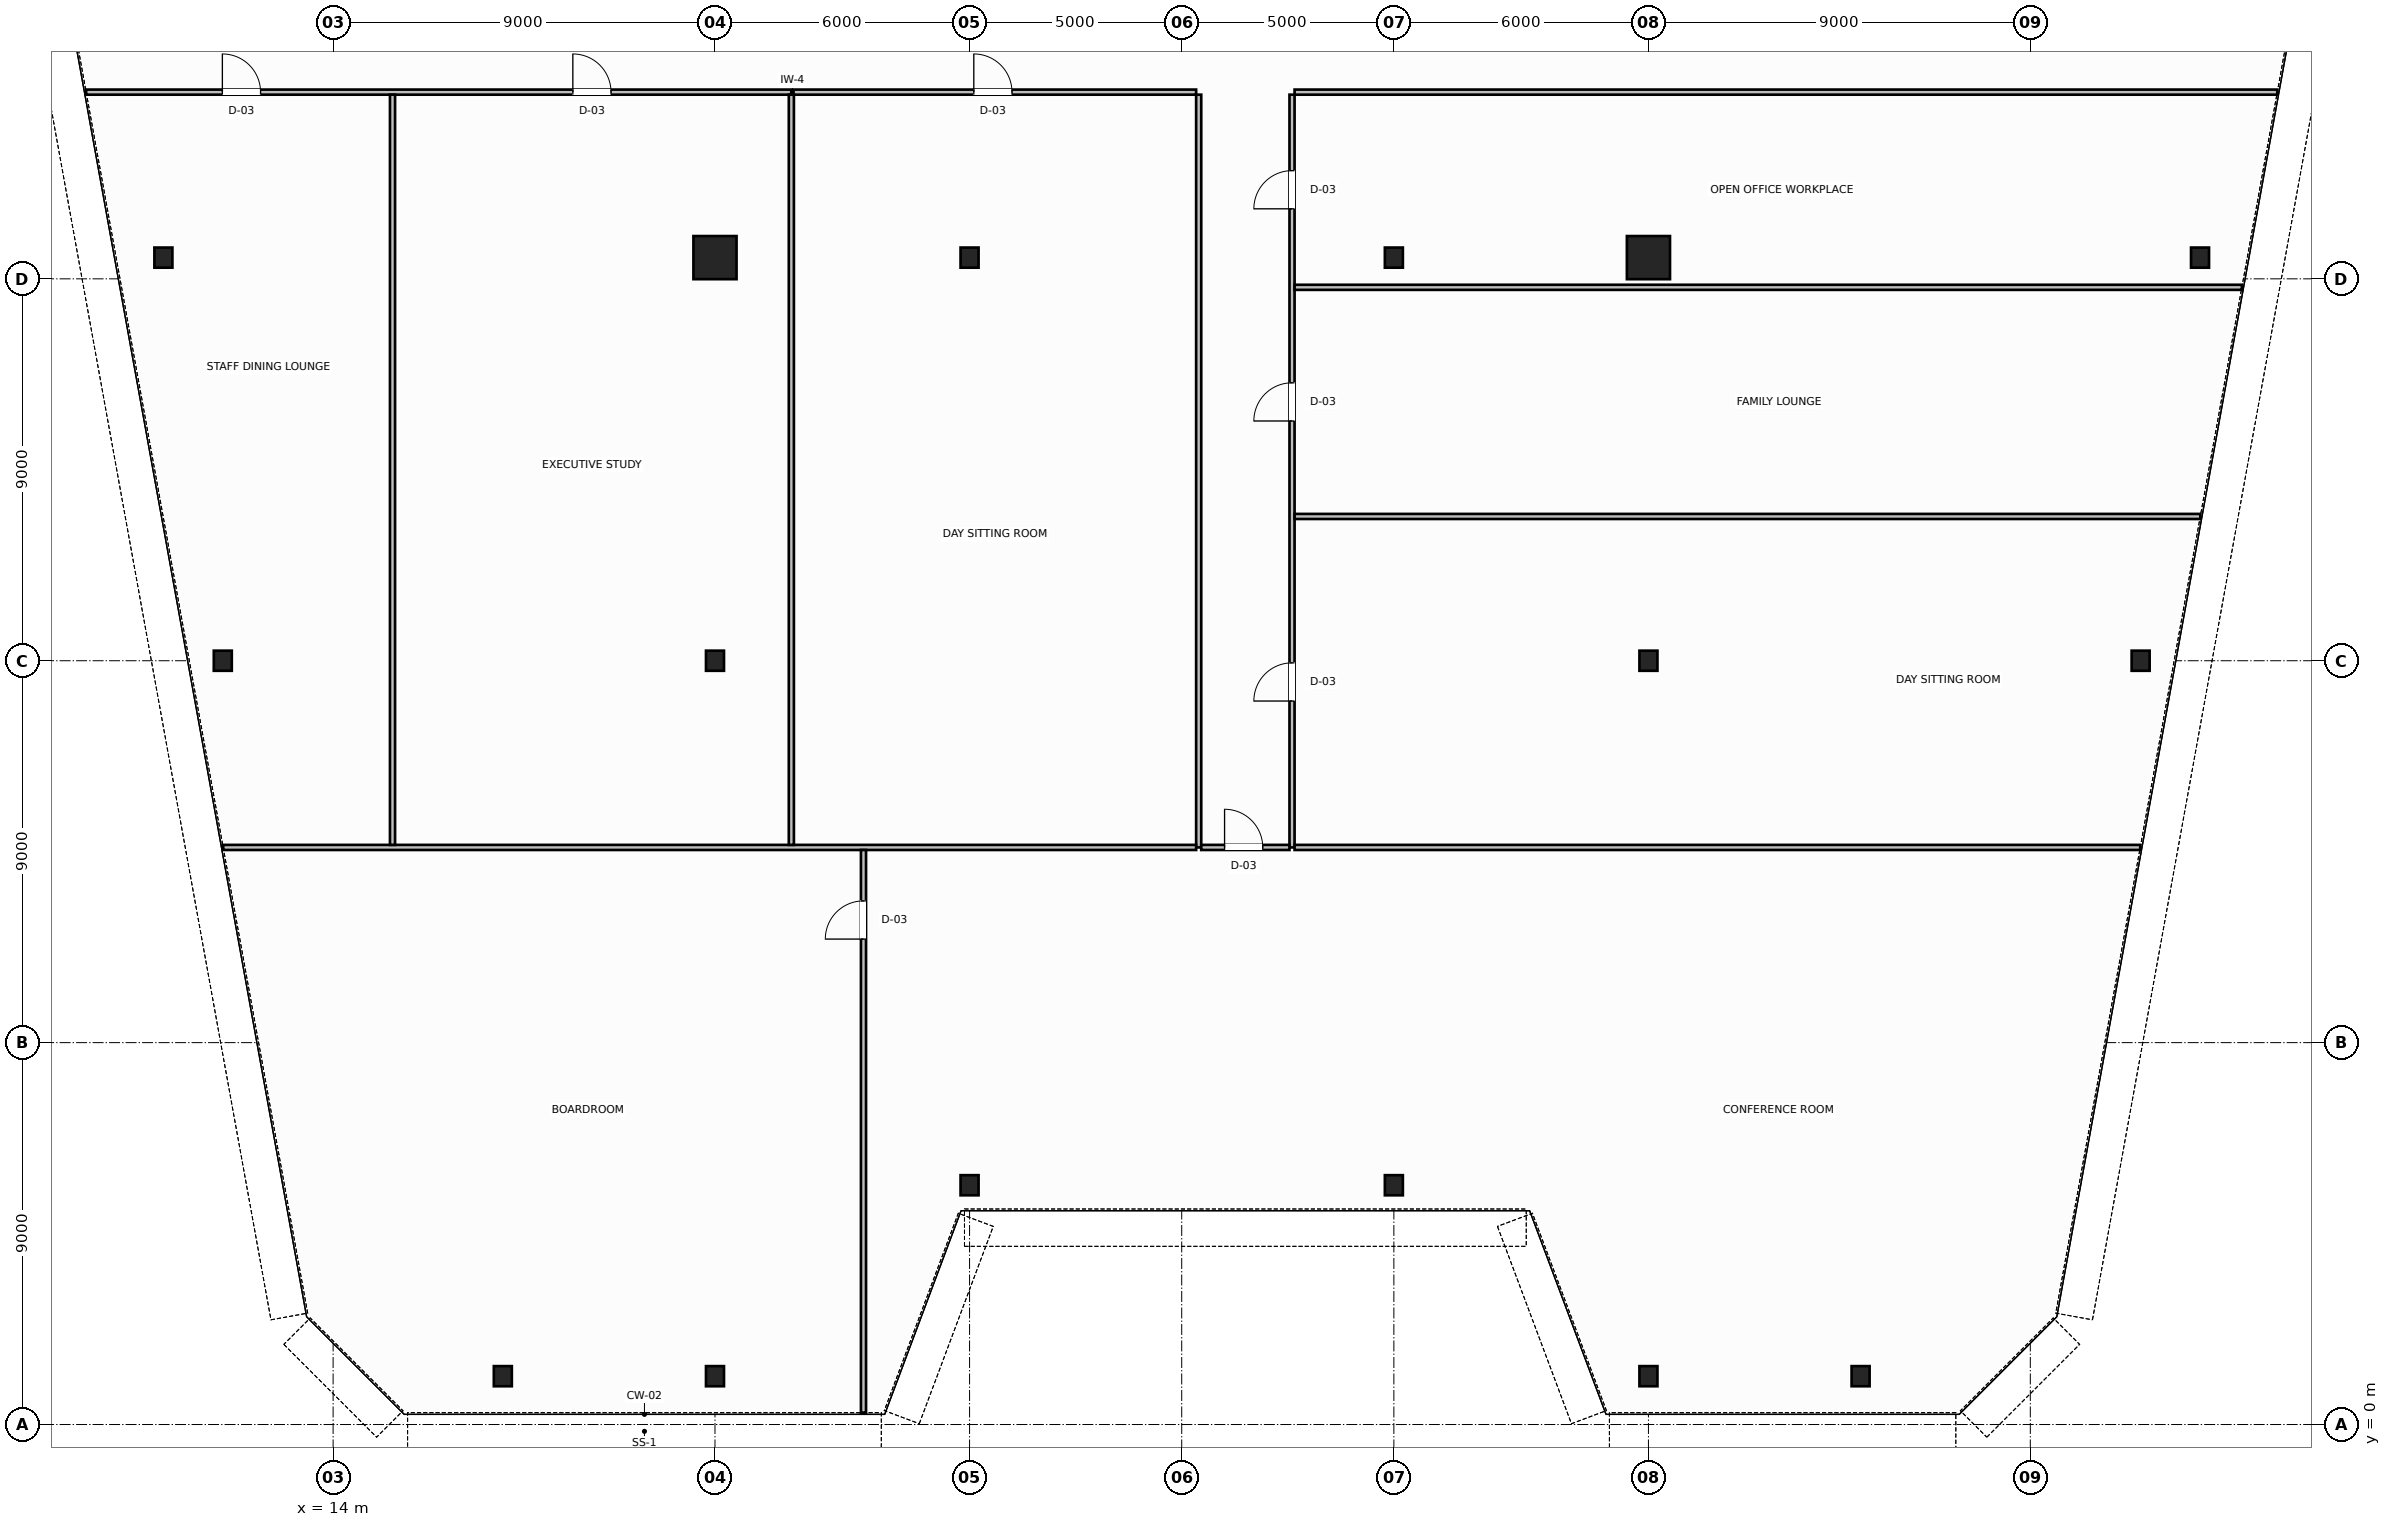
"""IFC4 building model, lengths in metres.
Left out: names, types, materials, properties, quantities, classifications, styles, units other than length and angle.
Written with IfcOpenShell. Run it as: python <this file> out.ifc"""

import sys

from ifc_helpers import new_model, si_unit, direction, frame, frame_2d, origin, origin_2d, place, context, subcontext, project, spatial, rectangle, hollow_circle, i_section, extrude, source, transform, mapped, element, fill, save


model = new_model("IFC4")
c1 = context("Model", 3, precision=1e-05, world=origin(), true_north=direction((0.0, 1.0)))
c2 = subcontext(c1, "Body", "Model", "MODEL_VIEW")
j1 = project(units=[si_unit("LENGTHUNIT", "METRE"), si_unit("PLANEANGLEUNIT", "RADIAN")], contexts=[c1])
p1 = place(None, origin())
s1 = spatial("IfcSite", under=j1, at=p1, CompositionType="ELEMENT")
p2 = place(p1, origin())
s2 = spatial("IfcBuilding", under=s1, at=p2, CompositionType="ELEMENT")
p3 = place(p2, frame((0.0, 0.0, 141.4)))
s3 = spatial("IfcBuildingStorey", under=s2, at=p3, CompositionType="ELEMENT", Elevation=141.4)
m1 = source(origin(), c2, "Body", "SweptSolid", [
    extrude(i_section(OverallWidth=0.424, OverallDepth=0.474, WebThickness=0.047, FlangeThickness=0.065, FilletRadius=0.015, at=origin_2d()), origin(), (0.0, 0.0, 1.0), 3.8),
])
for number, where, z_axis, x_axis in (
    (1, (10.0, 27.5, 0.0), (0.0, 0.0, 1.0), (1.0, 0.0, 0.0)),
    (2, (11.4, 18.0, 0.0), (0.0, 0.0, 1.0), (1.0, 0.0, 0.0)),
    (3, (58.0, 27.5, 0.0), (0.0, 0.0, 1.0), (1.0, 0.0, 0.0)),
    (4, (56.6, 18.0, 0.0), (0.0, 0.0, 1.0), (1.0, 0.0, 0.0)),
):
    element("IfcColumn", number, at=place(p3, frame(where, z_axis=z_axis, x_axis=x_axis)), inside=s3, PredefinedType="COLUMN", context=c2, shape_type="MappedRepresentation", body=[
        mapped(m1, transform((0.0, 0.0, 0.0), scale=1.0)),
    ])
m2 = source(origin(), c2, "Body", "SweptSolid", [
    extrude(hollow_circle(Radius=0.508, WallThickness=0.045, at=origin_2d()), origin(), (0.0, 0.0, 1.0), 3.8),
])
p4 = place(p3, frame((23.0, 27.5, 0.0), z_axis=(0.0, 0.0, 1.0), x_axis=(1.0, 0.0, 0.0)))
e5 = element("IfcColumn", 5, at=p4, inside=s3, PredefinedType="COLUMN", context=c2, shape_type="MappedRepresentation", body=[
    mapped(m2, transform((0.0, 0.0, 0.0), scale=1.0)),
])
m3 = source(origin(), c2, "Body", "SweptSolid", [
    extrude(i_section(OverallWidth=0.424, OverallDepth=0.474, WebThickness=0.047, FlangeThickness=0.065, FilletRadius=0.015, at=origin_2d()), origin(), (0.0, 0.0, 1.0), 3.8),
])
for number, where, z_axis, x_axis in (
    (6, (29.0, 27.5, 0.0), (0.0, 0.0, 1.0), (1.0, 0.0, 0.0)),
    (7, (39.0, 27.5, 0.0), (0.0, 0.0, 1.0), (1.0, 0.0, 0.0)),
):
    element("IfcColumn", number, at=place(p3, frame(where, z_axis=z_axis, x_axis=x_axis)), inside=s3, PredefinedType="COLUMN", context=c2, shape_type="MappedRepresentation", body=[
        mapped(m3, transform((0.0, 0.0, 0.0), scale=1.0)),
    ])
p5 = place(p3, frame((45.0, 27.5, 0.0), z_axis=(0.0, 0.0, 1.0), x_axis=(1.0, 0.0, 0.0)))
e8 = element("IfcColumn", 8, at=p5, inside=s3, PredefinedType="COLUMN", context=c2, shape_type="MappedRepresentation", body=[
    mapped(m2, transform((0.0, 0.0, 0.0), scale=1.0)),
])
for number, where, z_axis, x_axis in (
    (9, (23.0, 18.0, 0.0), (0.0, 0.0, 1.0), (1.0, 0.0, 0.0)),
    (10, (45.0, 18.0, 0.0), (0.0, 0.0, 1.0), (1.0, 0.0, 0.0)),
):
    element("IfcColumn", number, at=place(p3, frame(where, z_axis=z_axis, x_axis=x_axis)), inside=s3, PredefinedType="COLUMN", context=c2, shape_type="MappedRepresentation", body=[
        mapped(m3, transform((0.0, 0.0, 0.0), scale=1.0)),
    ])
m4 = source(origin(), c2, "Body", "SweptSolid", [
    extrude(i_section(OverallWidth=0.424, OverallDepth=0.474, WebThickness=0.047, FlangeThickness=0.065, FilletRadius=0.015, at=origin_2d()), origin(), (0.0, 0.0, 1.0), 3.744),
])
for number, where, z_axis, x_axis in (
    (11, (18.0, 1.139, 0.032), (0.0, -0.064, 0.998), (1.0, 0.0, 0.0)),
    (12, (23.0, 1.139, 0.032), (0.0, -0.064, 0.998), (1.0, 0.0, 0.0)),
    (13, (29.0, 5.639, 0.032), (0.0, -0.064, 0.998), (1.0, 0.0, 0.0)),
    (14, (39.0, 5.639, 0.032), (0.0, -0.064, 0.998), (1.0, 0.0, 0.0)),
    (15, (45.0, 1.139, 0.032), (0.0, -0.064, 0.998), (1.0, 0.0, 0.0)),
    (16, (50.0, 1.139, 0.032), (0.0, -0.064, 0.998), (1.0, 0.0, 0.0)),
):
    element("IfcColumn", number, at=place(p3, frame(where, z_axis=z_axis, x_axis=x_axis)), inside=s3, PredefinedType="COLUMN", context=c2, shape_type="MappedRepresentation", body=[
        mapped(m4, transform((0.0, 0.0, 0.0), scale=1.0)),
    ])
p6 = place(p3, frame((8.179, 31.4, 0.0), z_axis=(0.0, 0.0, 1.0), x_axis=(1.0, 0.0, 0.0)))
e17 = element("IfcWall", 17, at=p6, inside=s3, PredefinedType="PARTITIONING", context=c2, shape_type="SweptSolid", body=[
    extrude(rectangle(XDim=26.161, YDim=0.12, at=frame_2d((13.081, 0.0))), origin(), (0.0, 0.0, 1.0), 3.58),
])
p7 = place(p6, frame((3.211, 0.0, 0.0)))
e18 = element("IfcOpeningElement", 18, at=p7, cuts=e17, PredefinedType="OPENING", context=c2, shape_type="SweptSolid", body=[
    extrude(rectangle(XDim=0.9, YDim=2.15, at=frame_2d((0.45, 1.075))), frame((0.0, 0.07, 0.0), z_axis=(0.0, -1.0, 0.0), x_axis=(1.0, 0.0, 0.0)), (0.0, 0.0, 1.0), 0.14),
])
p8 = place(p6, frame((11.471, 0.0, 0.0)))
e19 = element("IfcOpeningElement", 19, at=p8, cuts=e17, PredefinedType="OPENING", context=c2, shape_type="SweptSolid", body=[
    extrude(rectangle(XDim=0.9, YDim=2.15, at=frame_2d((0.45, 1.075))), frame((0.0, 0.07, 0.0), z_axis=(0.0, -1.0, 0.0), x_axis=(1.0, 0.0, 0.0)), (0.0, 0.0, 1.0), 0.14),
])
p9 = place(p6, frame((20.921, 0.0, 0.0)))
e20 = element("IfcOpeningElement", 20, at=p9, cuts=e17, PredefinedType="OPENING", context=c2, shape_type="SweptSolid", body=[
    extrude(rectangle(XDim=0.9, YDim=2.15, at=frame_2d((0.45, 1.075))), frame((0.0, 0.07, 0.0), z_axis=(0.0, -1.0, 0.0), x_axis=(1.0, 0.0, 0.0)), (0.0, 0.0, 1.0), 0.14),
])
p10 = place(p3, frame((36.66, 31.4, 0.0), z_axis=(0.0, 0.0, 1.0), x_axis=(1.0, 0.0, 0.0)))
e21 = element("IfcWall", 21, at=p10, inside=s3, PredefinedType="PARTITIONING", context=c2, shape_type="SweptSolid", body=[
    extrude(rectangle(XDim=23.161, YDim=0.12, at=frame_2d((11.581, 0.0))), origin(), (0.0, 0.0, 1.0), 3.58),
])
p11 = place(p3, frame((34.4, 13.6, 0.0), z_axis=(0.0, 0.0, 1.0), x_axis=(0.0, 1.0, 0.0)))
e22 = element("IfcWall", 22, at=p11, inside=s3, PredefinedType="PARTITIONING", context=c2, shape_type="SweptSolid", body=[
    extrude(rectangle(XDim=17.74, YDim=0.12, at=frame_2d((8.87, 0.0))), origin(), (0.0, 0.0, 1.0), 3.58),
])
p12 = place(p3, frame((36.6, 13.6, 0.0), z_axis=(0.0, 0.0, 1.0), x_axis=(0.0, 1.0, 0.0)))
e23 = element("IfcWall", 23, at=p12, inside=s3, PredefinedType="PARTITIONING", context=c2, shape_type="SweptSolid", body=[
    extrude(rectangle(XDim=17.74, YDim=0.12, at=frame_2d((8.87, 0.0))), origin(), (0.0, 0.0, 1.0), 3.58),
])
p13 = place(p12, frame((3.45, 0.0, 0.0)))
e24 = element("IfcOpeningElement", 24, at=p13, cuts=e23, PredefinedType="OPENING", context=c2, shape_type="SweptSolid", body=[
    extrude(rectangle(XDim=0.9, YDim=2.15, at=frame_2d((0.45, 1.075))), frame((0.0, 0.07, 0.0), z_axis=(0.0, -1.0, 0.0), x_axis=(1.0, 0.0, 0.0)), (0.0, 0.0, 1.0), 0.14),
])
p14 = place(p12, frame((10.05, 0.0, 0.0)))
e25 = element("IfcOpeningElement", 25, at=p14, cuts=e23, PredefinedType="OPENING", context=c2, shape_type="SweptSolid", body=[
    extrude(rectangle(XDim=0.9, YDim=2.15, at=frame_2d((0.45, 1.075))), frame((0.0, 0.07, 0.0), z_axis=(0.0, -1.0, 0.0), x_axis=(1.0, 0.0, 0.0)), (0.0, 0.0, 1.0), 0.14),
])
p15 = place(p12, frame((15.05, 0.0, 0.0)))
e26 = element("IfcOpeningElement", 26, at=p15, cuts=e23, PredefinedType="OPENING", context=c2, shape_type="SweptSolid", body=[
    extrude(rectangle(XDim=0.9, YDim=2.15, at=frame_2d((0.45, 1.075))), frame((0.0, 0.07, 0.0), z_axis=(0.0, -1.0, 0.0), x_axis=(1.0, 0.0, 0.0)), (0.0, 0.0, 1.0), 0.14),
])
p16 = place(p3, frame((34.46, 13.6, 0.0), z_axis=(0.0, 0.0, 1.0), x_axis=(1.0, 0.0, 0.0)))
e27 = element("IfcWall", 27, at=p16, inside=s3, PredefinedType="PARTITIONING", context=c2, shape_type="SweptSolid", body=[
    extrude(rectangle(XDim=2.08, YDim=0.12, at=frame_2d((1.04, 0.0))), origin(), (0.0, 0.0, 1.0), 3.58),
])
p17 = place(p16, frame((0.55, 0.0, 0.0)))
e28 = element("IfcOpeningElement", 28, at=p17, cuts=e27, PredefinedType="OPENING", context=c2, shape_type="SweptSolid", body=[
    extrude(rectangle(XDim=0.9, YDim=2.15, at=frame_2d((0.45, 1.075))), frame((0.0, 0.07, 0.0), z_axis=(0.0, -1.0, 0.0), x_axis=(1.0, 0.0, 0.0)), (0.0, 0.0, 1.0), 0.14),
])
p18 = place(p3, frame((11.409, 13.6, 0.0), z_axis=(0.0, 0.0, 1.0), x_axis=(1.0, 0.0, 0.0)))
e29 = element("IfcWall", 29, at=p18, inside=s3, PredefinedType="PARTITIONING", context=c2, shape_type="SweptSolid", body=[
    extrude(rectangle(XDim=22.931, YDim=0.12, at=frame_2d((11.466, 0.0))), origin(), (0.0, 0.0, 1.0), 3.58),
])
p19 = place(p3, frame((36.66, 13.6, 0.0), z_axis=(0.0, 0.0, 1.0), x_axis=(1.0, 0.0, 0.0)))
e30 = element("IfcWall", 30, at=p19, inside=s3, PredefinedType="PARTITIONING", context=c2, shape_type="SweptSolid", body=[
    extrude(rectangle(XDim=19.931, YDim=0.12, at=frame_2d((9.966, 0.0))), origin(), (0.0, 0.0, 1.0), 3.58),
])
p20 = place(p3, frame((26.5, 0.279, 0.0), z_axis=(0.0, 0.0, 1.0), x_axis=(0.0, 1.0, 0.0)))
e31 = element("IfcWall", 31, at=p20, inside=s3, PredefinedType="PARTITIONING", context=c2, shape_type="SweptSolid", body=[
    extrude(rectangle(XDim=13.261, YDim=0.12, at=frame_2d((6.63, 0.0))), origin(), (0.0, 0.0, 1.0), 3.58),
])
p21 = place(p20, frame((11.161, 0.0, 0.0)))
e32 = element("IfcOpeningElement", 32, at=p21, cuts=e31, PredefinedType="OPENING", context=c2, shape_type="SweptSolid", body=[
    extrude(rectangle(XDim=0.9, YDim=2.15, at=frame_2d((0.45, 1.075))), frame((0.0, 0.07, 0.0), z_axis=(0.0, -1.0, 0.0), x_axis=(1.0, 0.0, 0.0)), (0.0, 0.0, 1.0), 0.14),
])
for number, where, z_axis, x_axis in (
    (33, (15.4, 13.66, 0.0), (0.0, 0.0, 1.0), (0.0, 1.0, 0.0)),
    (34, (24.8, 13.66, 0.0), (0.0, 0.0, 1.0), (0.0, 1.0, 0.0)),
):
    element("IfcWall", number, at=place(p3, frame(where, z_axis=z_axis, x_axis=x_axis)), inside=s3, PredefinedType="PARTITIONING", context=c2, shape_type="SweptSolid", body=[
        extrude(rectangle(XDim=17.68, YDim=0.12, at=frame_2d((8.84, 0.0))), origin(), (0.0, 0.0, 1.0), 3.58),
    ])
p22 = place(p3, frame((36.66, 21.4, 0.0), z_axis=(0.0, 0.0, 1.0), x_axis=(1.0, 0.0, 0.0)))
e35 = element("IfcWall", 35, at=p22, inside=s3, PredefinedType="PARTITIONING", context=c2, shape_type="SweptSolid", body=[
    extrude(rectangle(XDim=21.347, YDim=0.12, at=frame_2d((10.673, 0.0))), origin(), (0.0, 0.0, 1.0), 3.12),
])
p23 = place(p3, frame((36.66, 26.8, 0.0), z_axis=(0.0, 0.0, 1.0), x_axis=(1.0, 0.0, 0.0)))
e36 = element("IfcWall", 36, at=p23, inside=s3, PredefinedType="PARTITIONING", context=c2, shape_type="SweptSolid", body=[
    extrude(rectangle(XDim=22.326, YDim=0.12, at=frame_2d((11.163, 0.0))), origin(), (0.0, 0.0, 1.0), 3.58),
])
m5 = source(origin(), c2, "Body", "SweptSolid", [
    extrude(rectangle(XDim=0.9, YDim=2.15, at=frame_2d((0.45, 1.075))), frame((0.0, 0.025, 0.0), z_axis=(0.0, -1.0, 0.0), x_axis=(1.0, 0.0, 0.0)), (0.0, 0.0, 1.0), 0.05),
])
p24 = place(p21, origin())
e37 = element("IfcDoor", 37, at=p24, inside=s3, OperationType="SINGLE_SWING_RIGHT", PredefinedType="DOOR", context=c2, shape_type="MappedRepresentation", body=[
    mapped(m5, transform((0.0, 0.0, 0.0), scale=1.0)),
])
fill(e32, e37)
p25 = place(p17, origin())
e38 = element("IfcDoor", 38, at=p25, inside=s3, OperationType="SINGLE_SWING_LEFT", PredefinedType="DOOR", context=c2, shape_type="MappedRepresentation", body=[
    mapped(m5, transform((0.0, 0.0, 0.0), scale=1.0)),
])
fill(e28, e38)
p26 = place(p7, origin())
e39 = element("IfcDoor", 39, at=p26, inside=s3, OperationType="SINGLE_SWING_LEFT", PredefinedType="DOOR", context=c2, shape_type="MappedRepresentation", body=[
    mapped(m5, transform((0.0, 0.0, 0.0), scale=1.0)),
])
fill(e18, e39)
p27 = place(p8, origin())
e40 = element("IfcDoor", 40, at=p27, inside=s3, OperationType="SINGLE_SWING_RIGHT", PredefinedType="DOOR", context=c2, shape_type="MappedRepresentation", body=[
    mapped(m5, transform((0.0, 0.0, 0.0), scale=1.0)),
])
fill(e19, e40)
p28 = place(p9, origin())
e41 = element("IfcDoor", 41, at=p28, inside=s3, OperationType="SINGLE_SWING_LEFT", PredefinedType="DOOR", context=c2, shape_type="MappedRepresentation", body=[
    mapped(m5, transform((0.0, 0.0, 0.0), scale=1.0)),
])
fill(e20, e41)
p29 = place(p13, origin())
e42 = element("IfcDoor", 42, at=p29, inside=s3, OperationType="SINGLE_SWING_RIGHT", PredefinedType="DOOR", context=c2, shape_type="MappedRepresentation", body=[
    mapped(m5, transform((0.0, 0.0, 0.0), scale=1.0)),
])
fill(e24, e42)
p30 = place(p14, origin())
e43 = element("IfcDoor", 43, at=p30, inside=s3, OperationType="SINGLE_SWING_LEFT", PredefinedType="DOOR", context=c2, shape_type="MappedRepresentation", body=[
    mapped(m5, transform((0.0, 0.0, 0.0), scale=1.0)),
])
fill(e25, e43)
p31 = place(p15, origin())
e44 = element("IfcDoor", 44, at=p31, inside=s3, OperationType="SINGLE_SWING_RIGHT", PredefinedType="DOOR", context=c2, shape_type="MappedRepresentation", body=[
    mapped(m5, transform((0.0, 0.0, 0.0), scale=1.0)),
])
fill(e26, e44)
save(model, sys.argv[1])
